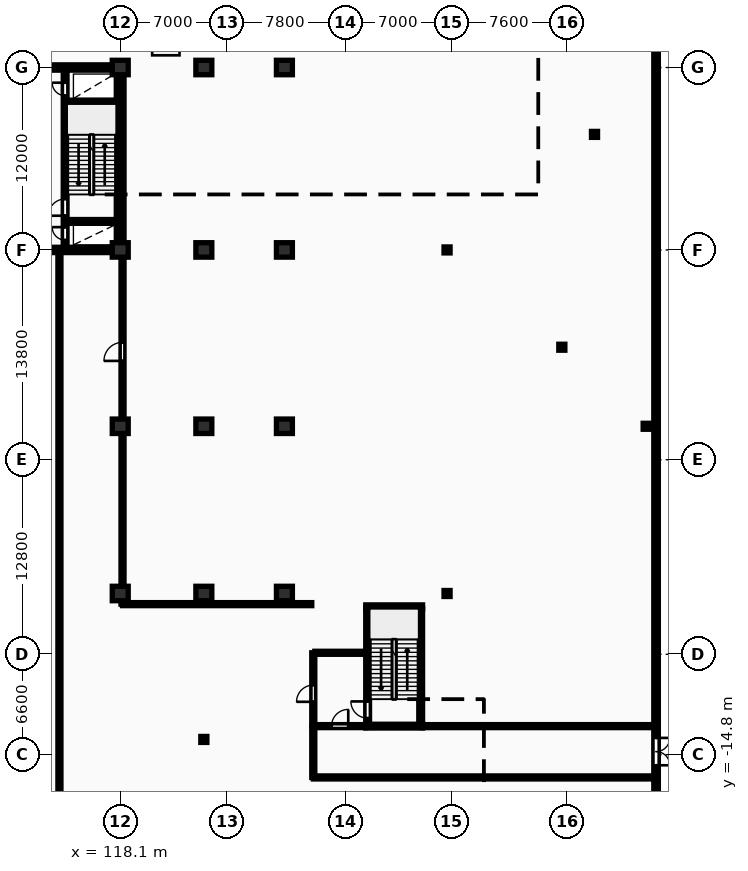
"""IFC4 building model, lengths in metres.
Left out: names, types, materials, properties, quantities, classifications, styles, units other than length and angle.
Written with IfcOpenShell. Run it as: python <this file> out.ifc"""

import sys

from ifc_helpers import new_model, si_unit, direction, frame, frame_2d, origin, origin_2d, place, context, subcontext, project, spatial, rectangle, i_section, extrude, element, fill, save


model = new_model("IFC4")
c1 = context("Model", 3, precision=1e-05, world=origin(), true_north=direction((0.0, 1.0)))
c2 = subcontext(c1, "Body", "Model", "MODEL_VIEW")
j1 = project(units=[si_unit("LENGTHUNIT", "METRE"), si_unit("PLANEANGLEUNIT", "RADIAN")], contexts=[c1])
p1 = place(None, origin())
s1 = spatial("IfcSite", under=j1, at=p1, CompositionType="ELEMENT")
p2 = place(p1, origin())
s2 = spatial("IfcBuilding", under=s1, at=p2, CompositionType="ELEMENT")
p3 = place(p2, origin())
s3 = spatial("IfcBuildingStorey", under=s2, at=p3, CompositionType="ELEMENT", Elevation=0.0)
for number, where, z_axis, x_axis in (
    (1, (118.1, -4.2, 0.0), (0.0, 0.0, 1.0), (1.0, 0.0, 0.0)),
    (2, (118.1, 6.8, 0.0), (0.0, 0.0, 1.0), (1.0, 0.0, 0.0)),
    (3, (118.1, 18.4, 0.0), (0.0, 0.0, 1.0), (1.0, 0.0, 0.0)),
    (4, (118.1, 30.4, 0.0), (0.0, 0.0, 1.0), (1.0, 0.0, 0.0)),
    (5, (123.6, -4.2, 0.0), (0.0, 0.0, 1.0), (1.0, 0.0, 0.0)),
    (6, (123.6, 6.8, 0.0), (0.0, 0.0, 1.0), (1.0, 0.0, 0.0)),
    (7, (123.6, 18.4, 0.0), (0.0, 0.0, 1.0), (1.0, 0.0, 0.0)),
    (8, (123.6, 30.4, 0.0), (0.0, 0.0, 1.0), (1.0, 0.0, 0.0)),
    (9, (128.9, -4.2, 0.0), (0.0, 0.0, 1.0), (1.0, 0.0, 0.0)),
    (10, (128.9, 6.8, 0.0), (0.0, 0.0, 1.0), (1.0, 0.0, 0.0)),
    (11, (128.9, 18.4, 0.0), (0.0, 0.0, 1.0), (1.0, 0.0, 0.0)),
    (12, (128.9, 30.4, 0.0), (0.0, 0.0, 1.0), (1.0, 0.0, 0.0)),
):
    element("IfcColumn", number, at=place(p3, frame(where, z_axis=z_axis, x_axis=x_axis)), inside=s3, PredefinedType="COLUMN", context=c2, shape_type="SweptSolid", body=[
        extrude(rectangle(XDim=1.05, YDim=0.95, at=origin_2d()), origin(), (0.0, 0.0, 1.0), 5.4),
    ])
for number, where, z_axis, x_axis in (
    (13, (139.6, -4.2, 0.0), (0.0, 0.0, 1.0), (1.0, 0.0, 0.0)),
    (14, (139.6, 18.4, 0.0), (0.0, 0.0, 1.0), (1.0, 0.0, 0.0)),
    (15, (123.6, -13.8, 0.0), (0.0, 0.0, 1.0), (1.0, 0.0, 0.0)),
    (16, (149.3, 26.0, 0.0), (0.0, 0.0, 1.0), (1.0, 0.0, 0.0)),
    (17, (147.15, 12.0, 0.0), (0.0, 0.0, 1.0), (1.0, 0.0, 0.0)),
    (18, (152.7, 6.8, 0.0), (0.0, 0.0, 1.0), (1.0, 0.0, 0.0)),
):
    element("IfcColumn", number, at=place(p3, frame(where, z_axis=z_axis, x_axis=x_axis)), inside=s3, PredefinedType="COLUMN", context=c2, shape_type="SweptSolid", body=[
        extrude(i_section(OverallWidth=0.399, OverallDepth=0.394, WebThickness=0.023, FlangeThickness=0.037, FilletRadius=0.015, at=origin_2d()), origin(), (0.0, 0.0, 1.0), 5.4),
    ])
p4 = place(p3, frame((153.35, -26.5, 0.0), z_axis=(0.0, 0.0, 1.0), x_axis=(0.0, 1.0, 0.0)))
e19 = element("IfcWall", 19, at=p4, inside=s3, PredefinedType="STANDARD", context=c2, shape_type="SweptSolid", body=[
    extrude(rectangle(XDim=135.7, YDim=0.3, at=frame_2d((67.85, 0.0))), origin(), (0.0, 0.0, 1.0), 5.1),
])
p5 = place(p4, frame((60.8, 0.0, 0.0)))
e20 = element("IfcOpeningElement", 20, at=p5, cuts=e19, PredefinedType="OPENING", context=c2, shape_type="SweptSolid", body=[
    extrude(rectangle(XDim=7.2, YDim=3.2, at=frame_2d((3.6, 1.6))), frame((0.0, 0.16, 0.0), z_axis=(0.0, -1.0, 0.0), x_axis=(1.0, 0.0, 0.0)), (0.0, 0.0, 1.0), 0.32),
])
p6 = place(p4, frame((70.1, 0.0, 0.0)))
e21 = element("IfcOpeningElement", 21, at=p6, cuts=e19, PredefinedType="OPENING", context=c2, shape_type="SweptSolid", body=[
    extrude(rectangle(XDim=1.8, YDim=2.2, at=frame_2d((0.9, 1.1))), frame((0.0, 0.16, 0.0), z_axis=(0.0, -1.0, 0.0), x_axis=(1.0, 0.0, 0.0)), (0.0, 0.0, 1.0), 0.32),
])
p7 = place(p4, frame((77.5, 0.0, 0.0)))
e22 = element("IfcOpeningElement", 22, at=p7, cuts=e19, PredefinedType="OPENING", context=c2, shape_type="SweptSolid", body=[
    extrude(rectangle(XDim=4.2, YDim=3.6, at=frame_2d((2.1, 1.8))), frame((0.0, 0.16, 0.0), z_axis=(0.0, -1.0, 0.0), x_axis=(1.0, 0.0, 0.0)), (0.0, 0.0, 1.0), 0.32),
])
p8 = place(p4, frame((11.0, 0.0, 0.0)))
e23 = element("IfcOpeningElement", 23, at=p8, cuts=e19, PredefinedType="OPENING", context=c2, shape_type="SweptSolid", body=[
    extrude(rectangle(XDim=1.8, YDim=2.2, at=frame_2d((0.9, 1.1))), frame((0.0, 0.16, 0.0), z_axis=(0.0, -1.0, 0.0), x_axis=(1.0, 0.0, 0.0)), (0.0, 0.0, 1.0), 0.32),
])
p9 = place(p4, frame((105.8, 0.0, 0.0)))
e24 = element("IfcOpeningElement", 24, at=p9, cuts=e19, PredefinedType="OPENING", context=c2, shape_type="SweptSolid", body=[
    extrude(rectangle(XDim=1.8, YDim=2.2, at=frame_2d((0.9, 1.1))), frame((0.0, 0.16, 0.0), z_axis=(0.0, -1.0, 0.0), x_axis=(1.0, 0.0, 0.0)), (0.0, 0.0, 1.0), 0.32),
])
p10 = place(p3, frame((81.925, 30.4, 0.0), z_axis=(0.0, 0.0, 1.0), x_axis=(1.0, 0.0, 0.0)))
e25 = element("IfcWall", 25, at=p10, inside=s3, PredefinedType="SHEAR", context=c2, shape_type="SweptSolid", body=[
    extrude(rectangle(XDim=36.265, YDim=0.35, at=frame_2d((18.132, 0.0))), origin(), (0.0, 0.0, 1.0), 5.4),
])
p11 = place(p3, frame((118.015, 18.575, 0.0), z_axis=(0.0, 0.0, 1.0), x_axis=(0.0, 1.0, 0.0)))
e26 = element("IfcWall", 26, at=p11, inside=s3, PredefinedType="SHEAR", context=c2, shape_type="SweptSolid", body=[
    extrude(rectangle(XDim=11.65, YDim=0.35, at=frame_2d((5.825, 0.0))), origin(), (0.0, 0.0, 1.0), 5.4),
])
p12 = place(p3, frame((81.925, 18.4, 0.0), z_axis=(0.0, 0.0, 1.0), x_axis=(1.0, 0.0, 0.0)))
e27 = element("IfcWall", 27, at=p12, inside=s3, PredefinedType="SHEAR", context=c2, shape_type="SweptSolid", body=[
    extrude(rectangle(XDim=36.265, YDim=0.35, at=frame_2d((18.132, 0.0))), origin(), (0.0, 0.0, 1.0), 5.4),
])
p13 = place(p12, frame((5.675, 0.0, 0.0)))
e28 = element("IfcOpeningElement", 28, at=p13, cuts=e27, PredefinedType="OPENING", context=c2, shape_type="SweptSolid", body=[
    extrude(rectangle(XDim=1.0, YDim=2.15, at=frame_2d((0.5, 1.075))), frame((0.0, 0.185, 0.0), z_axis=(0.0, -1.0, 0.0), x_axis=(1.0, 0.0, 0.0)), (0.0, 0.0, 1.0), 0.37),
])
p14 = place(p12, frame((21.925, 0.0, 0.0)))
e29 = element("IfcOpeningElement", 29, at=p14, cuts=e27, PredefinedType="OPENING", context=c2, shape_type="SweptSolid", body=[
    extrude(rectangle(XDim=1.5, YDim=2.2, at=frame_2d((0.75, 1.1))), frame((0.0, 0.185, 0.0), z_axis=(0.0, -1.0, 0.0), x_axis=(1.0, 0.0, 0.0)), (0.0, 0.0, 1.0), 0.37),
])
p15 = place(p12, frame((29.875, 0.0, 0.0)))
e30 = element("IfcOpeningElement", 30, at=p15, cuts=e27, PredefinedType="OPENING", context=c2, shape_type="SweptSolid", body=[
    extrude(rectangle(XDim=1.0, YDim=2.15, at=frame_2d((0.5, 1.075))), frame((0.0, 0.185, 0.0), z_axis=(0.0, -1.0, 0.0), x_axis=(1.0, 0.0, 0.0)), (0.0, 0.0, 1.0), 0.37),
])
p16 = place(p3, frame((114.475, 18.6, 0.0), z_axis=(0.0, 0.0, 1.0), x_axis=(0.0, 1.0, 0.0)))
e31 = element("IfcWall", 31, at=p16, inside=s3, PredefinedType="SHEAR", context=c2, shape_type="SweptSolid", body=[
    extrude(rectangle(XDim=11.6, YDim=0.25, at=frame_2d((5.8, 0.0))), origin(), (0.0, 0.0, 1.0), 5.4),
])
p17 = place(p16, frame((0.45, 0.0, 0.0)))
e32 = element("IfcOpeningElement", 32, at=p17, cuts=e31, PredefinedType="OPENING", context=c2, shape_type="SweptSolid", body=[
    extrude(rectangle(XDim=0.85, YDim=2.05, at=frame_2d((0.425, 1.025))), frame((0.0, 0.135, 0.0), z_axis=(0.0, -1.0, 0.0), x_axis=(1.0, 0.0, 0.0)), (0.0, 0.0, 1.0), 0.27),
])
p18 = place(p16, frame((2.05, 0.0, 0.0)))
e33 = element("IfcOpeningElement", 33, at=p18, cuts=e31, PredefinedType="OPENING", context=c2, shape_type="SweptSolid", body=[
    extrude(rectangle(XDim=1.1, YDim=2.1, at=frame_2d((0.55, 1.05))), frame((0.0, 0.135, 0.0), z_axis=(0.0, -1.0, 0.0), x_axis=(1.0, 0.0, 0.0)), (0.0, 0.0, 1.0), 0.27),
])
p19 = place(p16, frame((9.95, 0.0, 0.0)))
e34 = element("IfcOpeningElement", 34, at=p19, cuts=e31, PredefinedType="OPENING", context=c2, shape_type="SweptSolid", body=[
    extrude(rectangle(XDim=0.85, YDim=2.05, at=frame_2d((0.425, 1.025))), frame((0.0, 0.135, 0.0), z_axis=(0.0, -1.0, 0.0), x_axis=(1.0, 0.0, 0.0)), (0.0, 0.0, 1.0), 0.27),
])
for number, where, z_axis, x_axis in (
    (35, (114.6, 20.275, 0.0), (0.0, 0.0, 1.0), (1.0, 0.0, 0.0)),
    (36, (114.6, 28.125, 0.0), (0.0, 0.0, 1.0), (1.0, 0.0, 0.0)),
):
    element("IfcWall", number, at=place(p3, frame(where, z_axis=z_axis, x_axis=x_axis)), inside=s3, PredefinedType="SHEAR", context=c2, shape_type="SweptSolid", body=[
        extrude(rectangle(XDim=3.24, YDim=0.25, at=frame_2d((1.62, 0.0))), origin(), (0.0, 0.0, 1.0), 5.4),
    ])
p20 = place(p3, frame((134.375, -12.8, 0.0), z_axis=(0.0, 0.0, 1.0), x_axis=(0.0, 1.0, 0.0)))
e37 = element("IfcWall", 37, at=p20, inside=s3, PredefinedType="SHEAR", context=c2, shape_type="SweptSolid", body=[
    extrude(rectangle(XDim=7.6, YDim=0.25, at=frame_2d((3.8, 0.0))), origin(), (0.0, 0.0, 1.0), 5.4),
])
p21 = place(p20, frame((0.4, 0.0, 0.0)))
e38 = element("IfcOpeningElement", 38, at=p21, cuts=e37, PredefinedType="OPENING", context=c2, shape_type="SweptSolid", body=[
    extrude(rectangle(XDim=1.1, YDim=2.1, at=frame_2d((0.55, 1.05))), frame((0.0, 0.135, 0.0), z_axis=(0.0, -1.0, 0.0), x_axis=(1.0, 0.0, 0.0)), (0.0, 0.0, 1.0), 0.27),
])
p22 = place(p3, frame((137.865, -12.8, 0.0), z_axis=(0.0, 0.0, 1.0), x_axis=(0.0, 1.0, 0.0)))
e39 = element("IfcWall", 39, at=p22, inside=s3, PredefinedType="SHEAR", context=c2, shape_type="SweptSolid", body=[
    extrude(rectangle(XDim=7.6, YDim=0.25, at=frame_2d((3.8, 0.0))), origin(), (0.0, 0.0, 1.0), 5.4),
])
for number, where, z_axis, x_axis in (
    (40, (134.25, -12.925, 0.0), (0.0, 0.0, 1.0), (1.0, 0.0, 0.0)),
    (41, (134.25, -5.075, 0.0), (0.0, 0.0, 1.0), (1.0, 0.0, 0.0)),
):
    element("IfcWall", number, at=place(p3, frame(where, z_axis=z_axis, x_axis=x_axis)), inside=s3, PredefinedType="SHEAR", context=c2, shape_type="SweptSolid", body=[
        extrude(rectangle(XDim=3.74, YDim=0.25, at=frame_2d((1.87, 0.0))), origin(), (0.0, 0.0, 1.0), 5.4),
    ])
p23 = place(p3, frame((130.8, -12.925, 0.0), z_axis=(0.0, 0.0, 1.0), x_axis=(0.0, 1.0, 0.0)))
e42 = element("IfcWall", 42, at=p23, inside=s3, PredefinedType="PARTITIONING", context=c2, shape_type="SweptSolid", body=[
    extrude(rectangle(XDim=4.825, YDim=0.2, at=frame_2d((2.413, 0.0))), origin(), (0.0, 0.0, 1.0), 5.1),
])
p24 = place(p23, frame((1.6, 0.0, 0.0)))
e43 = element("IfcOpeningElement", 43, at=p24, cuts=e42, PredefinedType="OPENING", context=c2, shape_type="SweptSolid", body=[
    extrude(rectangle(XDim=1.1, YDim=2.15, at=frame_2d((0.55, 1.075))), frame((0.0, 0.11, 0.0), z_axis=(0.0, -1.0, 0.0), x_axis=(1.0, 0.0, 0.0)), (0.0, 0.0, 1.0), 0.22),
])
p25 = place(p3, frame((130.9, -12.925, 0.0), z_axis=(0.0, 0.0, 1.0), x_axis=(1.0, 0.0, 0.0)))
e44 = element("IfcWall", 44, at=p25, inside=s3, PredefinedType="PARTITIONING", context=c2, shape_type="SweptSolid", body=[
    extrude(rectangle(XDim=3.35, YDim=0.2, at=frame_2d((1.675, 0.0))), origin(), (0.0, 0.0, 1.0), 5.1),
])
p26 = place(p25, frame((1.1, 0.0, 0.0)))
e45 = element("IfcOpeningElement", 45, at=p26, cuts=e44, PredefinedType="OPENING", context=c2, shape_type="SweptSolid", body=[
    extrude(rectangle(XDim=1.1, YDim=2.1, at=frame_2d((0.55, 1.05))), frame((0.0, 0.11, 0.0), z_axis=(0.0, -1.0, 0.0), x_axis=(1.0, 0.0, 0.0)), (0.0, 0.0, 1.0), 0.22),
])
p27 = place(p3, frame((130.9, -8.1, 0.0), z_axis=(0.0, 0.0, 1.0), x_axis=(1.0, 0.0, 0.0)))
e46 = element("IfcWall", 46, at=p27, inside=s3, PredefinedType="PARTITIONING", context=c2, shape_type="SweptSolid", body=[
    extrude(rectangle(XDim=3.35, YDim=0.2, at=frame_2d((1.675, 0.0))), origin(), (0.0, 0.0, 1.0), 5.1),
])
p28 = place(p3, frame((114.1, -26.2, 0.0), z_axis=(0.0, 0.0, 1.0), x_axis=(0.0, 1.0, 0.0)))
e47 = element("IfcWall", 47, at=p28, inside=s3, PredefinedType="PARTITIONING", context=c2, shape_type="SweptSolid", body=[
    extrude(rectangle(XDim=44.35, YDim=0.2, at=frame_2d((22.175, 0.0))), origin(), (0.0, 0.0, 1.0), 5.1),
])
p29 = place(p3, frame((130.8, -16.3, 0.0), z_axis=(0.0, 0.0, 1.0), x_axis=(1.0, 0.0, 0.0)))
e48 = element("IfcWall", 48, at=p29, inside=s3, PredefinedType="PARTITIONING", context=c2, shape_type="SweptSolid", body=[
    extrude(rectangle(XDim=22.4, YDim=0.2, at=frame_2d((11.2, 0.0))), origin(), (0.0, 0.0, 1.0), 5.1),
])
p30 = place(p3, frame((138.0, -12.925, 0.0), z_axis=(0.0, 0.0, 1.0), x_axis=(1.0, 0.0, 0.0)))
e49 = element("IfcWall", 49, at=p30, inside=s3, PredefinedType="PARTITIONING", context=c2, shape_type="SweptSolid", body=[
    extrude(rectangle(XDim=15.2, YDim=0.2, at=frame_2d((7.6, 0.0))), origin(), (0.0, 0.0, 1.0), 5.1),
])
p31 = place(p3, frame((130.8, -16.3, 0.0), z_axis=(0.0, 0.0, 1.0), x_axis=(0.0, 1.0, 0.0)))
e50 = element("IfcWall", 50, at=p31, inside=s3, PredefinedType="PARTITIONING", context=c2, shape_type="SweptSolid", body=[
    extrude(rectangle(XDim=3.3, YDim=0.2, at=frame_2d((1.65, 0.0))), origin(), (0.0, 0.0, 1.0), 5.1),
])
p32 = place(p3, frame((118.25, -4.9, 0.0), z_axis=(0.0, 0.0, 1.0), x_axis=(0.0, 1.0, 0.0)))
e51 = element("IfcWall", 51, at=p32, inside=s3, PredefinedType="PARTITIONING", context=c2, shape_type="SweptSolid", body=[
    extrude(rectangle(XDim=35.35, YDim=0.2, at=frame_2d((17.675, 0.0))), origin(), (0.0, 0.0, 1.0), 4.35),
])
p33 = place(p32, frame((16.0, 0.0, 0.0)))
e52 = element("IfcOpeningElement", 52, at=p33, cuts=e51, PredefinedType="OPENING", context=c2, shape_type="SweptSolid", body=[
    extrude(rectangle(XDim=1.22, YDim=2.18, at=frame_2d((0.61, 1.09))), frame((0.0, 0.11, 0.0), z_axis=(0.0, -1.0, 0.0), x_axis=(1.0, 0.0, 0.0)), (0.0, 0.0, 1.0), 0.22),
])
p34 = place(p3, frame((118.25, -4.9, 0.0), z_axis=(0.0, 0.0, 1.0), x_axis=(1.0, 0.0, 0.0)))
e53 = element("IfcWall", 53, at=p34, inside=s3, PredefinedType="PARTITIONING", context=c2, shape_type="SweptSolid", body=[
    extrude(rectangle(XDim=12.45, YDim=0.2, at=frame_2d((6.225, 0.0))), origin(), (0.0, 0.0, 1.0), 5.1),
])
p35 = place(p8, frame((1.8, 0.0, 0.0), z_axis=(0.0, 0.0, 1.0), x_axis=(-1.0, 0.0, 0.0)))
e54 = element("IfcDoor", 54, at=p35, inside=s3, OperationType="DOUBLE_DOOR_SINGLE_SWING", PredefinedType="DOOR", context=c2, shape_type="SweptSolid", body=[
    extrude(rectangle(XDim=1.8, YDim=2.2, at=frame_2d((0.9, 1.1))), frame((0.0, 0.025, 0.0), z_axis=(0.0, -1.0, 0.0), x_axis=(1.0, 0.0, 0.0)), (0.0, 0.0, 1.0), 0.05),
])
fill(e23, e54)
p36 = place(p17, origin())
e55 = element("IfcDoor", 55, at=p36, inside=s3, OperationType="SINGLE_SWING_RIGHT", PredefinedType="DOOR", context=c2, shape_type="SweptSolid", body=[
    extrude(rectangle(XDim=0.85, YDim=2.05, at=frame_2d((0.425, 1.025))), frame((0.0, 0.025, 0.0), z_axis=(0.0, -1.0, 0.0), x_axis=(1.0, 0.0, 0.0)), (0.0, 0.0, 1.0), 0.05),
])
fill(e32, e55)
p37 = place(p18, origin())
e56 = element("IfcDoor", 56, at=p37, inside=s3, OperationType="SINGLE_SWING_LEFT", PredefinedType="DOOR", context=c2, shape_type="SweptSolid", body=[
    extrude(rectangle(XDim=1.1, YDim=2.1, at=frame_2d((0.55, 1.05))), frame((0.0, 0.025, 0.0), z_axis=(0.0, -1.0, 0.0), x_axis=(1.0, 0.0, 0.0)), (0.0, 0.0, 1.0), 0.05),
])
fill(e33, e56)
p38 = place(p19, origin())
e57 = element("IfcDoor", 57, at=p38, inside=s3, OperationType="SINGLE_SWING_RIGHT", PredefinedType="DOOR", context=c2, shape_type="SweptSolid", body=[
    extrude(rectangle(XDim=0.85, YDim=2.05, at=frame_2d((0.425, 1.025))), frame((0.0, 0.025, 0.0), z_axis=(0.0, -1.0, 0.0), x_axis=(1.0, 0.0, 0.0)), (0.0, 0.0, 1.0), 0.05),
])
fill(e34, e57)
p39 = place(p21, origin())
e58 = element("IfcDoor", 58, at=p39, inside=s3, OperationType="SINGLE_SWING_RIGHT", PredefinedType="DOOR", context=c2, shape_type="SweptSolid", body=[
    extrude(rectangle(XDim=1.1, YDim=2.1, at=frame_2d((0.55, 1.05))), frame((0.0, 0.025, 0.0), z_axis=(0.0, -1.0, 0.0), x_axis=(1.0, 0.0, 0.0)), (0.0, 0.0, 1.0), 0.05),
])
fill(e38, e58)
p40 = place(p24, origin())
e59 = element("IfcDoor", 59, at=p40, inside=s3, OperationType="SINGLE_SWING_LEFT", PredefinedType="DOOR", context=c2, shape_type="SweptSolid", body=[
    extrude(rectangle(XDim=1.1, YDim=2.15, at=frame_2d((0.55, 1.075))), frame((0.0, 0.025, 0.0), z_axis=(0.0, -1.0, 0.0), x_axis=(1.0, 0.0, 0.0)), (0.0, 0.0, 1.0), 0.05),
])
fill(e43, e59)
p41 = place(p26, origin())
e60 = element("IfcDoor", 60, at=p41, inside=s3, OperationType="SINGLE_SWING_RIGHT", PredefinedType="DOOR", context=c2, shape_type="SweptSolid", body=[
    extrude(rectangle(XDim=1.1, YDim=2.1, at=frame_2d((0.55, 1.05))), frame((0.0, 0.025, 0.0), z_axis=(0.0, -1.0, 0.0), x_axis=(1.0, 0.0, 0.0)), (0.0, 0.0, 1.0), 0.05),
])
fill(e45, e60)
p42 = place(p33, origin())
e61 = element("IfcDoor", 61, at=p42, inside=s3, OperationType="SINGLE_SWING_LEFT", PredefinedType="DOOR", context=c2, shape_type="SweptSolid", body=[
    extrude(rectangle(XDim=1.22, YDim=2.18, at=frame_2d((0.61, 1.09))), frame((0.0, 0.025, 0.0), z_axis=(0.0, -1.0, 0.0), x_axis=(1.0, 0.0, 0.0)), (0.0, 0.0, 1.0), 0.05),
])
fill(e52, e61)
save(model, sys.argv[1])
